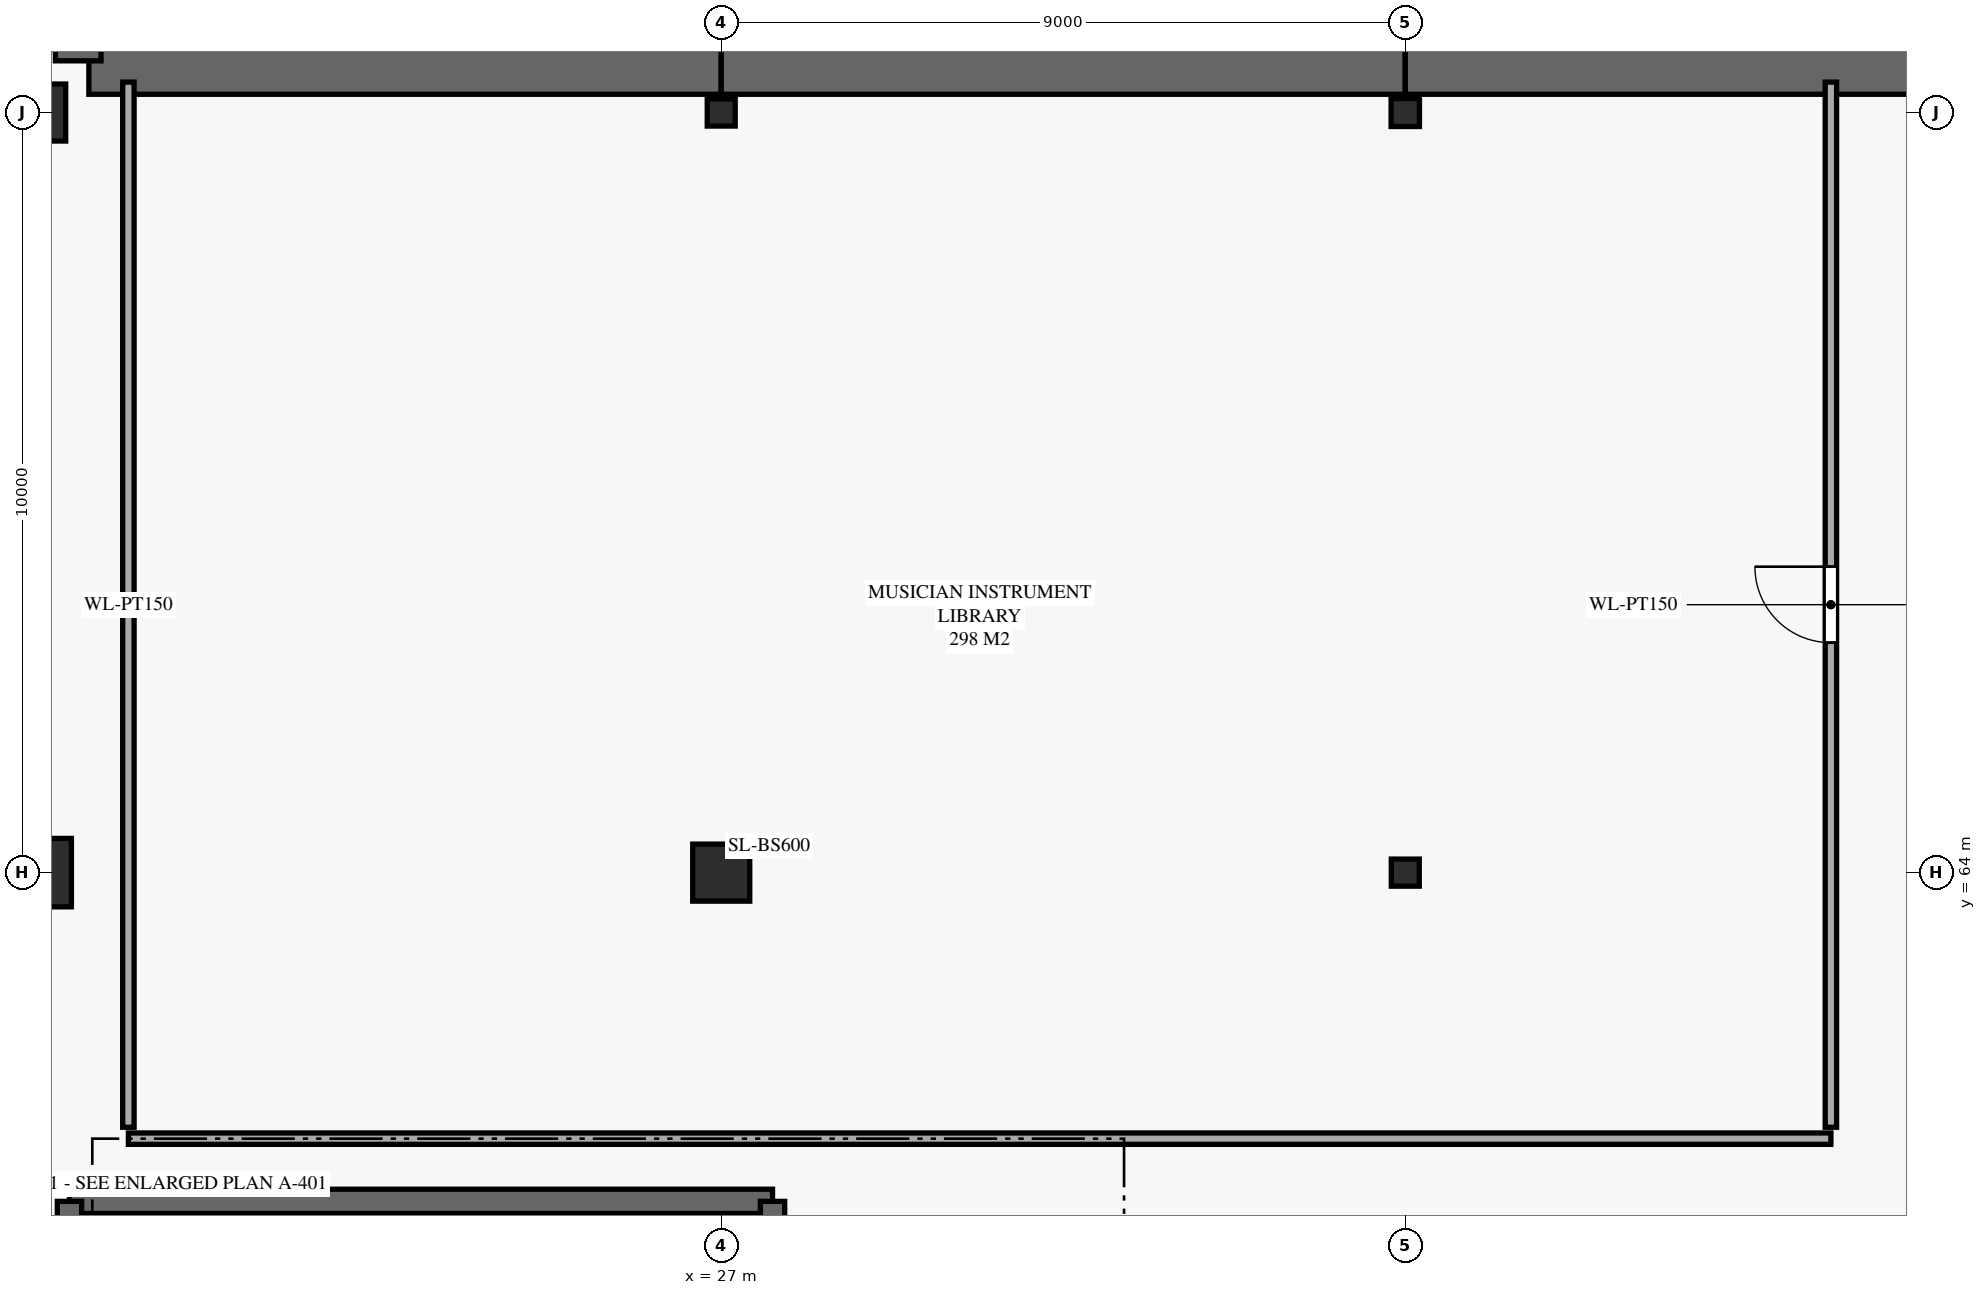
"""IFC4 building model, lengths in metres.
Left out: names, types, materials, properties, quantities, classifications, styles, units other than length and angle.
Written with IfcOpenShell. Run it as: python <this file> out.ifc"""

import sys

from ifc_helpers import new_model, si_unit, direction, frame, frame_2d, origin, origin_2d, place, context, subcontext, project, spatial, rectangle, i_section, extrude, element, fill, save


model = new_model("IFC4")
c1 = context("Model", 3, precision=1e-05, world=origin(), true_north=direction((0.0, 1.0)))
c2 = subcontext(c1, "Body", "Model", "MODEL_VIEW")
j1 = project(units=[si_unit("LENGTHUNIT", "METRE"), si_unit("PLANEANGLEUNIT", "RADIAN")], contexts=[c1])
p1 = place(None, origin())
s1 = spatial("IfcSite", under=j1, at=p1, CompositionType="ELEMENT")
p2 = place(p1, origin())
s2 = spatial("IfcBuilding", under=s1, at=p2, CompositionType="ELEMENT")
p3 = place(p2, frame((0.0, 0.0, -5.4)))
s3 = spatial("IfcBuildingStorey", under=s2, at=p3, CompositionType="ELEMENT", Elevation=-5.4)
p4 = place(p3, frame((18.0, 64.0, -0.6), z_axis=(0.0, 0.0, 1.0), x_axis=(1.0, 0.0, 0.0)))
e1 = element("IfcColumn", 1, at=p4, inside=s3, PredefinedType="COLUMN", context=c2, shape_type="SweptSolid", body=[
    extrude(rectangle(XDim=0.9, YDim=0.9, at=origin_2d()), origin(), (0.0, 0.0, 1.0), 6.0),
])
for number, where, z_axis, x_axis in (
    (2, (18.0, 74.0, -0.6), (0.0, 0.0, 1.0), (1.0, 0.0, 0.0)),
    (3, (27.0, 64.0, -0.6), (0.0, 0.0, 1.0), (1.0, 0.0, 0.0)),
):
    element("IfcColumn", number, at=place(p3, frame(where, z_axis=z_axis, x_axis=x_axis)), inside=s3, PredefinedType="COLUMN", context=c2, shape_type="SweptSolid", body=[
        extrude(rectangle(XDim=0.75, YDim=0.75, at=origin_2d()), origin(), (0.0, 0.0, 1.0), 6.0),
    ])
for number, where, z_axis, x_axis in (
    (4, (27.0, 74.0, -0.6), (0.0, 0.0, 1.0), (1.0, 0.0, 0.0)),
    (5, (36.0, 64.0, -0.6), (0.0, 0.0, 1.0), (1.0, 0.0, 0.0)),
):
    element("IfcColumn", number, at=place(p3, frame(where, z_axis=z_axis, x_axis=x_axis)), inside=s3, PredefinedType="COLUMN", context=c2, shape_type="SweptSolid", body=[
        extrude(i_section(OverallWidth=0.368, OverallDepth=0.356, WebThickness=0.011, FlangeThickness=0.018, FilletRadius=0.015, at=origin_2d()), origin(), (0.0, 0.0, 1.0), 6.0),
    ])
p5 = place(p3, frame((36.0, 74.0, -0.6), z_axis=(0.0, 0.0, 1.0), x_axis=(1.0, 0.0, 0.0)))
e6 = element("IfcColumn", 6, at=p5, inside=s3, PredefinedType="COLUMN", context=c2, shape_type="SweptSolid", body=[
    extrude(i_section(OverallWidth=0.373, OverallDepth=0.368, WebThickness=0.015, FlangeThickness=0.024, FilletRadius=0.015, at=origin_2d()), origin(), (0.0, 0.0, 1.0), 6.0),
])
p6 = place(p3, frame((27.675, 59.675, 0.0), z_axis=(0.0, 0.0, 1.0), x_axis=(-1.0, 0.0, 0.0)))
e7 = element("IfcWall", 7, at=p6, inside=s3, PredefinedType="SHEAR", context=c2, shape_type="SweptSolid", body=[
    extrude(rectangle(XDim=9.25, YDim=0.32, at=frame_2d((4.625, 0.0))), origin(), (0.0, 0.0, 1.0), 5.05),
])
p7 = place(p3, frame((18.425, 59.675, 0.0), z_axis=(0.0, 0.0, 1.0), x_axis=(0.0, -1.0, 0.0)))
e8 = element("IfcWall", 8, at=p7, inside=s3, PredefinedType="SHEAR", context=c2, shape_type="SweptSolid", body=[
    extrude(rectangle(XDim=5.05, YDim=0.32, at=frame_2d((2.525, 0.0))), origin(), (0.0, 0.0, 1.0), 5.05),
])
p8 = place(p7, frame((1.85, 0.0, 0.0)))
e9 = element("IfcOpeningElement", 9, at=p8, cuts=e8, PredefinedType="OPENING", context=c2, shape_type="SweptSolid", body=[
    extrude(rectangle(XDim=1.15, YDim=2.2, at=frame_2d((0.575, 1.1))), frame((0.0, 0.17, 0.0), z_axis=(0.0, -1.0, 0.0), x_axis=(1.0, 0.0, 0.0)), (0.0, 0.0, 1.0), 0.34),
])
p9 = place(p3, frame((27.675, 54.625, 0.0), z_axis=(0.0, 0.0, 1.0), x_axis=(0.0, 1.0, 0.0)))
e10 = element("IfcWall", 10, at=p9, inside=s3, PredefinedType="SHEAR", context=c2, shape_type="SweptSolid", body=[
    extrude(rectangle(XDim=5.05, YDim=0.32, at=frame_2d((2.525, 0.0))), origin(), (0.0, 0.0, 1.0), 5.05),
])
p10 = place(p3, frame((18.68, 74.54, 0.0), z_axis=(0.0, 0.0, 1.0), x_axis=(1.0, 0.0, 0.0)))
e11 = element("IfcWall", 11, at=p10, inside=s3, PredefinedType="USERDEFINED", context=c2, shape_type="SweptSolid", body=[
    extrude(rectangle(XDim=8.32, YDim=0.6, at=frame_2d((4.16, 0.0))), origin(), (0.0, 0.0, 1.0), 5.05),
])
p11 = place(p3, frame((27.0, 74.54, 0.0), z_axis=(0.0, 0.0, 1.0), x_axis=(1.0, 0.0, 0.0)))
e12 = element("IfcWall", 12, at=p11, inside=s3, PredefinedType="USERDEFINED", context=c2, shape_type="SweptSolid", body=[
    extrude(rectangle(XDim=9.0, YDim=0.6, at=frame_2d((4.5, 0.0))), origin(), (0.0, 0.0, 1.0), 5.05),
])
p12 = place(p3, frame((36.0, 74.54, 0.0), z_axis=(0.0, 0.0, 1.0), x_axis=(1.0, 0.0, 0.0)))
e13 = element("IfcWall", 13, at=p12, inside=s3, PredefinedType="USERDEFINED", context=c2, shape_type="SweptSolid", body=[
    extrude(rectangle(XDim=8.32, YDim=0.6, at=frame_2d((4.16, 0.0))), origin(), (0.0, 0.0, 1.0), 5.05),
])
p13 = place(p3, frame((18.54, 84.0, 0.0), z_axis=(0.0, 0.0, 1.0), x_axis=(0.0, -1.0, 0.0)))
e14 = element("IfcWall", 14, at=p13, inside=s3, PredefinedType="USERDEFINED", context=c2, shape_type="SweptSolid", body=[
    extrude(rectangle(XDim=9.32, YDim=0.6, at=frame_2d((4.66, 0.0))), origin(), (0.0, 0.0, 1.0), 5.05),
])
p14 = place(p3, frame((19.2, 60.5, 0.0), z_axis=(0.0, 0.0, 1.0), x_axis=(1.0, 0.0, 0.0)))
e15 = element("IfcWall", 15, at=p14, inside=s3, PredefinedType="PARTITIONING", context=c2, shape_type="SweptSolid", body=[
    extrude(rectangle(XDim=22.4, YDim=0.15, at=frame_2d((11.2, 0.0))), origin(), (0.0, 0.0, 1.0), 5.05),
])
p15 = place(p3, frame((19.2, 74.4, 0.0), z_axis=(0.0, 0.0, 1.0), x_axis=(0.0, -1.0, 0.0)))
e16 = element("IfcWall", 16, at=p15, inside=s3, PredefinedType="PARTITIONING", context=c2, shape_type="SweptSolid", body=[
    extrude(rectangle(XDim=13.75, YDim=0.15, at=frame_2d((6.875, 0.0))), origin(), (0.0, 0.0, 1.0), 5.05),
])
p16 = place(p3, frame((41.6, 60.65, 0.0), z_axis=(0.0, 0.0, 1.0), x_axis=(0.0, 1.0, 0.0)))
e17 = element("IfcWall", 17, at=p16, inside=s3, PredefinedType="PARTITIONING", context=c2, shape_type="SweptSolid", body=[
    extrude(rectangle(XDim=13.75, YDim=0.15, at=frame_2d((6.875, 0.0))), origin(), (0.0, 0.0, 1.0), 5.05),
])
p17 = place(p16, frame((6.375, 0.0, 0.0)))
e18 = element("IfcOpeningElement", 18, at=p17, cuts=e17, PredefinedType="OPENING", context=c2, shape_type="SweptSolid", body=[
    extrude(rectangle(XDim=1.0, YDim=2.15, at=frame_2d((0.5, 1.075))), frame((0.0, 0.085, 0.0), z_axis=(0.0, -1.0, 0.0), x_axis=(1.0, 0.0, 0.0)), (0.0, 0.0, 1.0), 0.17),
])
p18 = place(p17, origin())
e19 = element("IfcDoor", 19, at=p18, inside=s3, OperationType="SINGLE_SWING_RIGHT", PredefinedType="DOOR", context=c2, shape_type="SweptSolid", body=[
    extrude(rectangle(XDim=1.0, YDim=2.15, at=frame_2d((0.5, 1.075))), frame((0.0, 0.025, 0.0), z_axis=(0.0, -1.0, 0.0), x_axis=(1.0, 0.0, 0.0)), (0.0, 0.0, 1.0), 0.05),
])
fill(e18, e19)
save(model, sys.argv[1])
